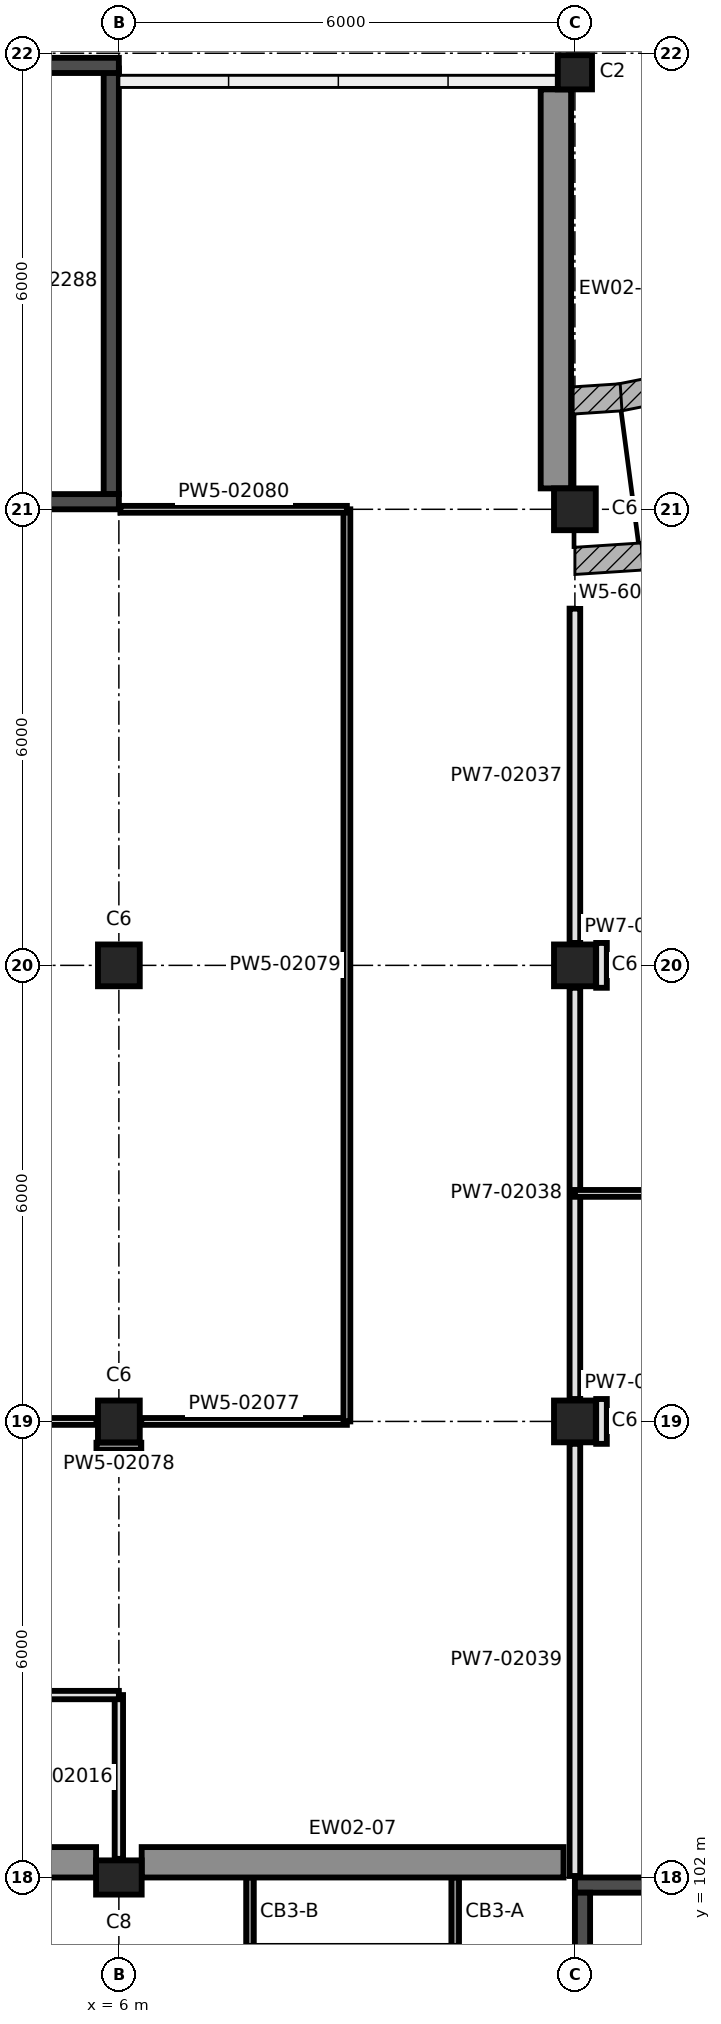
"""IFC4 building model, lengths in metres.
Left out: names, types, materials, properties, quantities, classifications, styles, units other than length and angle.
Written with IfcOpenShell. Run it as: python <this file> out.ifc"""

import sys

from ifc_helpers import new_model, si_unit, direction, frame, frame_2d, origin, origin_2d, place, context, subcontext, project, spatial, polyline, rectangle, outline, extrude, element, fill, save


model = new_model("IFC4")
c1 = context("Model", 3, precision=1e-05, world=origin(), true_north=direction((0.0, 1.0)))
c2 = subcontext(c1, "Body", "Model", "MODEL_VIEW")
j1 = project(units=[si_unit("LENGTHUNIT", "METRE"), si_unit("PLANEANGLEUNIT", "RADIAN")], contexts=[c1])
p1 = place(None, origin())
s1 = spatial("IfcSite", under=j1, at=p1, CompositionType="ELEMENT")
p2 = place(p1, origin())
s2 = spatial("IfcBuilding", under=s1, at=p2, CompositionType="ELEMENT")
p3 = place(p2, frame((0.0, 0.0, 12.0)))
s3 = spatial("IfcBuildingStorey", under=s2, at=p3, CompositionType="ELEMENT", Elevation=12.0)
p4 = place(p3, frame((6.0, 102.0, 0.0), z_axis=(0.0, 0.0, 1.0), x_axis=(1.0, 0.0, 0.0)))
e1 = element("IfcColumn", 1, at=p4, inside=s3, PredefinedType="COLUMN", context=c2, shape_type="SweptSolid", body=[
    extrude(rectangle(XDim=0.6, YDim=0.45, at=origin_2d()), origin(), (0.0, 0.0, 1.0), 4.25),
])
for number, where, z_axis, x_axis in (
    (2, (6.0, 108.0, 0.0), (0.0, 0.0, 1.0), (1.0, 0.0, 0.0)),
    (3, (12.0, 108.0, 0.0), (0.0, 0.0, 1.0), (1.0, 0.0, 0.0)),
    (4, (6.0, 114.0, 0.0), (0.0, 0.0, 1.0), (1.0, 0.0, 0.0)),
    (5, (12.0, 114.0, 0.0), (0.0, 0.0, 1.0), (1.0, 0.0, 0.0)),
    (6, (12.0, 120.0, 0.0), (0.0, 0.0, 1.0), (1.0, 0.0, 0.0)),
):
    element("IfcColumn", number, at=place(p3, frame(where, z_axis=z_axis, x_axis=x_axis)), inside=s3, PredefinedType="COLUMN", context=c2, shape_type="SweptSolid", body=[
        extrude(rectangle(XDim=0.55, YDim=0.55, at=origin_2d()), origin(), (0.0, 0.0, 1.0), 4.25),
    ])
p5 = place(p3, frame((12.0, 125.75, 0.0), z_axis=(0.0, 0.0, 1.0), x_axis=(1.0, 0.0, 0.0)))
e7 = element("IfcColumn", 7, at=p5, inside=s3, PredefinedType="COLUMN", context=c2, shape_type="SweptSolid", body=[
    extrude(rectangle(XDim=0.45, YDim=0.45, at=origin_2d()), origin(), (0.0, 0.0, 1.0), 4.25),
])
p6 = place(p3, frame((12.0, 101.9, 0.0), z_axis=(0.0, 0.0, 1.0), x_axis=(1.0, 0.0, 0.0)))
e8 = element("IfcWall", 8, at=p6, inside=s3, PredefinedType="SHEAR", context=c2, shape_type="SweptSolid", body=[
    extrude(rectangle(XDim=6.0, YDim=0.2, at=frame_2d((3.0, 0.0))), origin(), (0.0, 0.0, 1.0), 4.5),
])
p7 = place(p6, frame((2.1, 0.0, 0.0)))
e9 = element("IfcOpeningElement", 9, at=p7, cuts=e8, PredefinedType="OPENING", context=c2, shape_type="SweptSolid", body=[
    extrude(rectangle(XDim=1.8, YDim=2.2, at=frame_2d((0.9, 1.1))), frame((0.0, 0.11, 0.0), z_axis=(0.0, -1.0, 0.0), x_axis=(1.0, 0.0, 0.0)), (0.0, 0.0, 1.0), 0.22),
])
p8 = place(p3, frame((12.1, 96.2, 0.0), z_axis=(0.0, 0.0, 1.0), x_axis=(0.0, 1.0, 0.0)))
e10 = element("IfcWall", 10, at=p8, inside=s3, PredefinedType="SHEAR", context=c2, shape_type="SweptSolid", body=[
    extrude(rectangle(XDim=5.6, YDim=0.2, at=frame_2d((2.8, 0.0))), origin(), (0.0, 0.0, 1.0), 4.5),
])
p9 = place(p8, frame((2.55, 0.0, 0.9)))
e11 = element("IfcOpeningElement", 11, at=p9, cuts=e10, PredefinedType="OPENING", context=c2, shape_type="SweptSolid", body=[
    extrude(rectangle(XDim=0.5, YDim=2.1, at=frame_2d((0.25, 1.05))), frame((0.0, 0.11, 0.0), z_axis=(0.0, -1.0, 0.0), x_axis=(1.0, 0.0, 0.0)), (0.0, 0.0, 1.0), 0.22),
])
for number, where, z_axis, x_axis in (
    (12, (0.0, 125.84, 0.0), (0.0, 0.0, 1.0), (1.0, 0.0, 0.0)),
    (13, (0.0, 120.1, 0.0), (0.0, 0.0, 1.0), (1.0, 0.0, 0.0)),
):
    element("IfcWall", number, at=place(p3, frame(where, z_axis=z_axis, x_axis=x_axis)), inside=s3, PredefinedType="SHEAR", context=c2, shape_type="SweptSolid", body=[
        extrude(rectangle(XDim=6.0, YDim=0.2, at=frame_2d((3.0, 0.0))), origin(), (0.0, 0.0, 1.0), 4.25),
    ])
p10 = place(p3, frame((5.9, 120.2, 0.0), z_axis=(0.0, 0.0, 1.0), x_axis=(0.0, 1.0, 0.0)))
e14 = element("IfcWall", 14, at=p10, inside=s3, PredefinedType="SHEAR", context=c2, shape_type="SweptSolid", body=[
    extrude(rectangle(XDim=5.6, YDim=0.2, at=frame_2d((2.8, 0.0))), origin(), (0.0, 0.0, 1.0), 4.25),
])
p11 = place(p10, frame((4.4, 0.0, 0.0)))
e15 = element("IfcOpeningElement", 15, at=p11, cuts=e14, PredefinedType="OPENING", context=c2, shape_type="SweptSolid", body=[
    extrude(rectangle(XDim=1.1, YDim=2.2, at=frame_2d((0.55, 1.1))), frame((0.0, 0.11, 0.0), z_axis=(0.0, -1.0, 0.0), x_axis=(1.0, 0.0, 0.0)), (0.0, 0.0, 1.0), 0.22),
])
p12 = place(p3, frame((13.775, 119.376, 0.0), z_axis=(0.173864175636, -0.874485160623, 0.452821104058), x_axis=(-0.980806494595, -0.194983637213, 3.7134606e-05)))
e16 = element("IfcWall", 16, at=p12, inside=s3, PredefinedType="SOLIDWALL", context=c2, shape_type="SweptSolid", body=[
    extrude(outline(polyline([(0.0, 0.0), (0.897, 0.0), (0.759, -4.654), (0.138, -4.654), (0.0, 0.0)])), origin(), (-0.0, 0.453, 0.892), 0.449),
])
p13 = place(p3, frame((12.895, 119.201, 0.0), z_axis=(0.058375301922, -0.889685498337, 0.452826719811), x_axis=(-0.997852682036, -0.065498262539, -5.0577314e-05)))
e17 = element("IfcWall", 17, at=p13, inside=s3, PredefinedType="SOLIDWALL", context=c2, shape_type="SweptSolid", body=[
    extrude(outline(polyline([(0.0, 0.0), (0.897, 3.469e-18), (0.758, -4.654), (0.138, -4.654), (0.0, 0.0)])), origin(), (9.547e-05, 0.453, 0.892), 0.449),
])
p14 = place(p3, frame((11.85, 102.2, 0.0), z_axis=(0.0, 0.0, 1.0), x_axis=(-1.0, 0.0, 0.0)))
e18 = element("IfcWall", 18, at=p14, inside=s3, PredefinedType="SOLIDWALL", context=c2, shape_type="SweptSolid", body=[
    extrude(rectangle(XDim=5.55, YDim=0.4, at=frame_2d((2.775, 0.0))), origin(), (0.0, 0.0, 1.0), 3.8),
])
p15 = place(p14, frame((1.575, 0.0, 0.9)))
e19 = element("IfcOpeningElement", 19, at=p15, cuts=e18, PredefinedType="OPENING", context=c2, shape_type="SweptSolid", body=[
    extrude(rectangle(XDim=2.4, YDim=2.45, at=frame_2d((1.2, 1.225))), frame((0.0, 0.21, 0.0), z_axis=(0.0, -1.0, 0.0), x_axis=(1.0, 0.0, 0.0)), (0.0, 0.0, 1.0), 0.42),
])
p16 = place(p3, frame((5.7, 102.2, 0.0), z_axis=(0.0, 0.0, 1.0), x_axis=(-1.0, 0.0, 0.0)))
e20 = element("IfcWall", 20, at=p16, inside=s3, PredefinedType="SOLIDWALL", context=c2, shape_type="SweptSolid", body=[
    extrude(rectangle(XDim=3.5, YDim=0.4, at=frame_2d((1.75, 0.0))), origin(), (0.0, 0.0, 1.0), 4.25),
])
p17 = place(p16, frame((1.075, 0.0, 0.9)))
e21 = element("IfcOpeningElement", 21, at=p17, cuts=e20, PredefinedType="OPENING", context=c2, shape_type="SweptSolid", body=[
    extrude(rectangle(XDim=1.35, YDim=2.45, at=frame_2d((0.675, 1.225))), frame((0.0, 0.21, 0.0), z_axis=(0.0, -1.0, 0.0), x_axis=(1.0, 0.0, 0.0)), (0.0, 0.0, 1.0), 0.42),
])
p18 = place(p3, frame((11.75, 125.524, 0.0), z_axis=(0.0, 0.0, 1.0), x_axis=(0.0, -1.0, 0.0)))
e22 = element("IfcWall", 22, at=p18, inside=s3, PredefinedType="SOLIDWALL", context=c2, shape_type="SweptSolid", body=[
    extrude(rectangle(XDim=5.25, YDim=0.4, at=frame_2d((2.625, 0.0))), origin(), (0.0, 0.0, 1.0), 4.25),
])
for number, where, z_axis, x_axis in (
    (23, (10.425, 102.0, 0.0), (0.0, 0.0, 1.0), (0.0, -1.0, 0.0)),
    (24, (7.725, 102.0, 0.0), (0.0, 0.0, 1.0), (0.0, -1.0, 0.0)),
):
    element("IfcWall", number, at=place(p3, frame(where, z_axis=z_axis, x_axis=x_axis)), inside=s3, PredefinedType="SOLIDWALL", context=c2, shape_type="SweptSolid", body=[
        extrude(rectangle(XDim=0.9, YDim=0.1, at=frame_2d((0.45, 0.0))), origin(), (0.0, 0.0, 1.0), 3.5),
    ])
p19 = place(p3, frame((6.0, 102.245, 0.0), z_axis=(0.0, 0.0, 1.0), x_axis=(0.0, 1.0, 0.0)))
e25 = element("IfcWall", 25, at=p19, inside=s3, PredefinedType="PARTITIONING", context=c2, shape_type="SweptSolid", body=[
    extrude(rectangle(XDim=2.155, YDim=0.11, at=frame_2d((1.077, 0.0))), origin(), (0.0, 0.0, 1.0), 3.75),
])
p20 = place(p3, frame((2.22, 104.4, 0.0), z_axis=(0.0, 0.0, 1.0), x_axis=(1.0, 0.0, 0.0)))
e26 = element("IfcWall", 26, at=p20, inside=s3, PredefinedType="PARTITIONING", context=c2, shape_type="SweptSolid", body=[
    extrude(rectangle(XDim=3.78, YDim=0.11, at=frame_2d((1.89, 0.0))), origin(), (0.0, 0.0, 1.0), 3.75),
])
p21 = place(p20, frame((1.53, 0.0, 0.0)))
e27 = element("IfcOpeningElement", 27, at=p21, cuts=e26, PredefinedType="OPENING", context=c2, shape_type="SweptSolid", body=[
    extrude(rectangle(XDim=0.75, YDim=2.04, at=frame_2d((0.375, 1.02))), frame((0.0, 0.065, 0.0), z_axis=(0.0, -1.0, 0.0), x_axis=(1.0, 0.0, 0.0)), (0.0, 0.0, 1.0), 0.13),
])
p22 = place(p3, frame((12.0, 114.295, 0.0), z_axis=(0.0, 0.0, 1.0), x_axis=(0.0, 1.0, 0.0)))
e28 = element("IfcWall", 28, at=p22, inside=s3, PredefinedType="PARTITIONING", context=c2, shape_type="SweptSolid", body=[
    extrude(rectangle(XDim=4.398, YDim=0.14, at=frame_2d((2.199, 0.0))), origin(), (0.0, 0.0, 1.0), 3.45),
])
p23 = place(p22, frame((0.155, 0.0, 0.0)))
e29 = element("IfcOpeningElement", 29, at=p23, cuts=e28, PredefinedType="OPENING", context=c2, shape_type="SweptSolid", body=[
    extrude(rectangle(XDim=0.92, YDim=2.04, at=frame_2d((0.46, 1.02))), frame((0.0, 0.08, 0.0), z_axis=(0.0, -1.0, 0.0), x_axis=(1.0, 0.0, 0.0)), (0.0, 0.0, 1.0), 0.16),
])
p24 = place(p3, frame((12.0, 108.295, 0.0), z_axis=(0.0, 0.0, 1.0), x_axis=(0.0, 1.0, 0.0)))
e30 = element("IfcWall", 30, at=p24, inside=s3, PredefinedType="PARTITIONING", context=c2, shape_type="SweptSolid", body=[
    extrude(rectangle(XDim=5.41, YDim=0.14, at=frame_2d((2.705, 0.0))), origin(), (0.0, 0.0, 1.0), 3.45),
])
p25 = place(p24, frame((0.255, 0.0, 0.0)))
e31 = element("IfcOpeningElement", 31, at=p25, cuts=e30, PredefinedType="OPENING", context=c2, shape_type="SweptSolid", body=[
    extrude(rectangle(XDim=1.8, YDim=2.1, at=frame_2d((0.9, 1.05))), frame((0.0, 0.08, 0.0), z_axis=(0.0, -1.0, 0.0), x_axis=(1.0, 0.0, 0.0)), (0.0, 0.0, 1.0), 0.16),
])
p26 = place(p3, frame((12.0, 102.02, 0.0), z_axis=(0.0, 0.0, 1.0), x_axis=(0.0, 1.0, 0.0)))
e32 = element("IfcWall", 32, at=p26, inside=s3, PredefinedType="PARTITIONING", context=c2, shape_type="SweptSolid", body=[
    extrude(rectangle(XDim=5.685, YDim=0.14, at=frame_2d((2.843, 0.0))), origin(), (0.0, 0.0, 1.0), 3.55),
])
p27 = place(p26, frame((2.03, 0.0, 0.0)))
e33 = element("IfcOpeningElement", 33, at=p27, cuts=e32, PredefinedType="OPENING", context=c2, shape_type="SweptSolid", body=[
    extrude(rectangle(XDim=1.8, YDim=2.1, at=frame_2d((0.9, 1.05))), frame((0.0, 0.08, 0.0), z_axis=(0.0, -1.0, 0.0), x_axis=(1.0, 0.0, 0.0)), (0.0, 0.0, 1.0), 0.16),
])
p28 = place(p3, frame((12.35, 113.705, 0.0), z_axis=(0.0, 0.0, 1.0), x_axis=(0.0, 1.0, 0.0)))
e34 = element("IfcWall", 34, at=p28, inside=s3, PredefinedType="PARTITIONING", context=c2, shape_type="SweptSolid", body=[
    extrude(rectangle(XDim=0.59, YDim=0.14, at=frame_2d((0.295, 0.0))), origin(), (0.0, 0.0, 1.0), 4.25),
])
p29 = place(p3, frame((12.35, 107.705, 0.0), z_axis=(0.0, 0.0, 1.0), x_axis=(0.0, 1.0, 0.0)))
e35 = element("IfcWall", 35, at=p29, inside=s3, PredefinedType="PARTITIONING", context=c2, shape_type="SweptSolid", body=[
    extrude(rectangle(XDim=0.59, YDim=0.14, at=frame_2d((0.295, 0.0))), origin(), (0.0, 0.0, 1.0), 3.55),
])
p30 = place(p3, frame((12.0, 111.0, 0.0), z_axis=(0.0, 0.0, 1.0), x_axis=(1.0, 0.0, 0.0)))
e36 = element("IfcWall", 36, at=p30, inside=s3, PredefinedType="PARTITIONING", context=c2, shape_type="SweptSolid", body=[
    extrude(rectangle(XDim=6.0, YDim=0.09, at=frame_2d((3.0, 0.0))), origin(), (0.0, 0.0, 1.0), 4.25),
])
p31 = place(p3, frame((0.38, 108.0, 0.0), z_axis=(0.0, 0.0, 1.0), x_axis=(1.0, 0.0, 0.0)))
e37 = element("IfcWall", 37, at=p31, inside=s3, PredefinedType="PARTITIONING", context=c2, shape_type="SweptSolid", body=[
    extrude(rectangle(XDim=5.325, YDim=0.09, at=frame_2d((2.663, 0.0))), origin(), (0.0, 0.0, 1.0), 4.28),
])
p32 = place(p3, frame((6.295, 108.0, 0.0), z_axis=(0.0, 0.0, 1.0), x_axis=(1.0, 0.0, 0.0)))
e38 = element("IfcWall", 38, at=p32, inside=s3, PredefinedType="PARTITIONING", context=c2, shape_type="SweptSolid", body=[
    extrude(rectangle(XDim=2.705, YDim=0.09, at=frame_2d((1.353, 0.0))), origin(), (0.0, 0.0, 1.0), 3.75),
])
p33 = place(p3, frame((5.705, 107.675, 0.0), z_axis=(0.0, 0.0, 1.0), x_axis=(1.0, 0.0, 0.0)))
e39 = element("IfcWall", 39, at=p33, inside=s3, PredefinedType="PARTITIONING", context=c2, shape_type="SweptSolid", body=[
    extrude(rectangle(XDim=0.59, YDim=0.09, at=frame_2d((0.295, 0.0))), origin(), (0.0, 0.0, 1.0), 3.75),
])
p34 = place(p3, frame((9.0, 108.0, 0.0), z_axis=(0.0, 0.0, 1.0), x_axis=(0.0, 1.0, 0.0)))
e40 = element("IfcWall", 40, at=p34, inside=s3, PredefinedType="PARTITIONING", context=c2, shape_type="SweptSolid", body=[
    extrude(rectangle(XDim=12.0, YDim=0.09, at=frame_2d((6.0, 0.0))), origin(), (0.0, 0.0, 1.0), 3.75),
])
p35 = place(p34, frame((5.25, 0.0, 0.0)))
e41 = element("IfcOpeningElement", 41, at=p35, cuts=e40, PredefinedType="OPENING", context=c2, shape_type="SweptSolid", body=[
    extrude(rectangle(XDim=1.5, YDim=2.1, at=frame_2d((0.75, 1.05))), frame((0.0, 0.055, 0.0), z_axis=(0.0, -1.0, 0.0), x_axis=(1.0, 0.0, 0.0)), (0.0, 0.0, 1.0), 0.11),
])
p36 = place(p3, frame((6.02, 120.0, 0.0), z_axis=(0.0, 0.0, 1.0), x_axis=(1.0, 0.0, 0.0)))
e42 = element("IfcWall", 42, at=p36, inside=s3, PredefinedType="PARTITIONING", context=c2, shape_type="SweptSolid", body=[
    extrude(rectangle(XDim=2.98, YDim=0.09, at=frame_2d((1.49, 0.0))), origin(), (0.0, 0.0, 1.0), 4.28),
])
p37 = place(p15, origin())
e43 = element("IfcWindow", 43, at=p37, inside=s3, PartitioningType="SINGLE_PANEL", PredefinedType="WINDOW", context=c2, shape_type="SweptSolid", body=[
    extrude(rectangle(XDim=2.4, YDim=2.45, at=frame_2d((1.2, 1.225))), frame((0.0, 0.03, 0.0), z_axis=(0.0, -1.0, 0.0), x_axis=(1.0, 0.0, 0.0)), (0.0, 0.0, 1.0), 0.06),
])
fill(e19, e43)
p38 = place(p35, frame((1.5, 0.0, 0.0), z_axis=(0.0, 0.0, 1.0), x_axis=(-1.0, 0.0, 0.0)))
e44 = element("IfcDoor", 44, at=p38, inside=s3, OperationType="DOUBLE_DOOR_SINGLE_SWING", PredefinedType="DOOR", context=c2, shape_type="SweptSolid", body=[
    extrude(rectangle(XDim=1.5, YDim=2.1, at=frame_2d((0.75, 1.05))), frame((0.0, 0.025, 0.0), z_axis=(0.0, -1.0, 0.0), x_axis=(1.0, 0.0, 0.0)), (0.0, 0.0, 1.0), 0.05),
])
fill(e41, e44)
p39 = place(p23, frame((0.92, 0.0, 0.0), z_axis=(0.0, 0.0, 1.0), x_axis=(-1.0, 0.0, 0.0)))
e45 = element("IfcDoor", 45, at=p39, inside=s3, OperationType="SINGLE_SWING_RIGHT", PredefinedType="DOOR", context=c2, shape_type="SweptSolid", body=[
    extrude(rectangle(XDim=0.92, YDim=2.04, at=frame_2d((0.46, 1.02))), frame((0.0, 0.025, 0.0), z_axis=(0.0, -1.0, 0.0), x_axis=(1.0, 0.0, 0.0)), (0.0, 0.0, 1.0), 0.05),
])
fill(e29, e45)
p40 = place(p11, origin())
e46 = element("IfcDoor", 46, at=p40, inside=s3, OperationType="SINGLE_SWING_LEFT", PredefinedType="DOOR", context=c2, shape_type="SweptSolid", body=[
    extrude(rectangle(XDim=1.1, YDim=2.2, at=frame_2d((0.55, 1.1))), frame((0.0, 0.025, 0.0), z_axis=(0.0, -1.0, 0.0), x_axis=(1.0, 0.0, 0.0)), (0.0, 0.0, 1.0), 0.05),
])
fill(e15, e46)
p41 = place(p27, frame((1.8, 0.0, 0.0), z_axis=(0.0, 0.0, 1.0), x_axis=(-1.0, 0.0, 0.0)))
e47 = element("IfcDoor", 47, at=p41, inside=s3, OperationType="DOUBLE_DOOR_SINGLE_SWING", PredefinedType="DOOR", context=c2, shape_type="SweptSolid", body=[
    extrude(rectangle(XDim=1.8, YDim=2.1, at=frame_2d((0.9, 1.05))), frame((0.0, 0.025, 0.0), z_axis=(0.0, -1.0, 0.0), x_axis=(1.0, 0.0, 0.0)), (0.0, 0.0, 1.0), 0.05),
])
fill(e33, e47)
p42 = place(p25, frame((1.8, 0.0, 0.0), z_axis=(0.0, 0.0, 1.0), x_axis=(-1.0, 0.0, 0.0)))
e48 = element("IfcDoor", 48, at=p42, inside=s3, OperationType="DOUBLE_DOOR_SINGLE_SWING", PredefinedType="DOOR", context=c2, shape_type="SweptSolid", body=[
    extrude(rectangle(XDim=1.8, YDim=2.1, at=frame_2d((0.9, 1.05))), frame((0.0, 0.025, 0.0), z_axis=(0.0, -1.0, 0.0), x_axis=(1.0, 0.0, 0.0)), (0.0, 0.0, 1.0), 0.05),
])
fill(e31, e48)
save(model, sys.argv[1])
